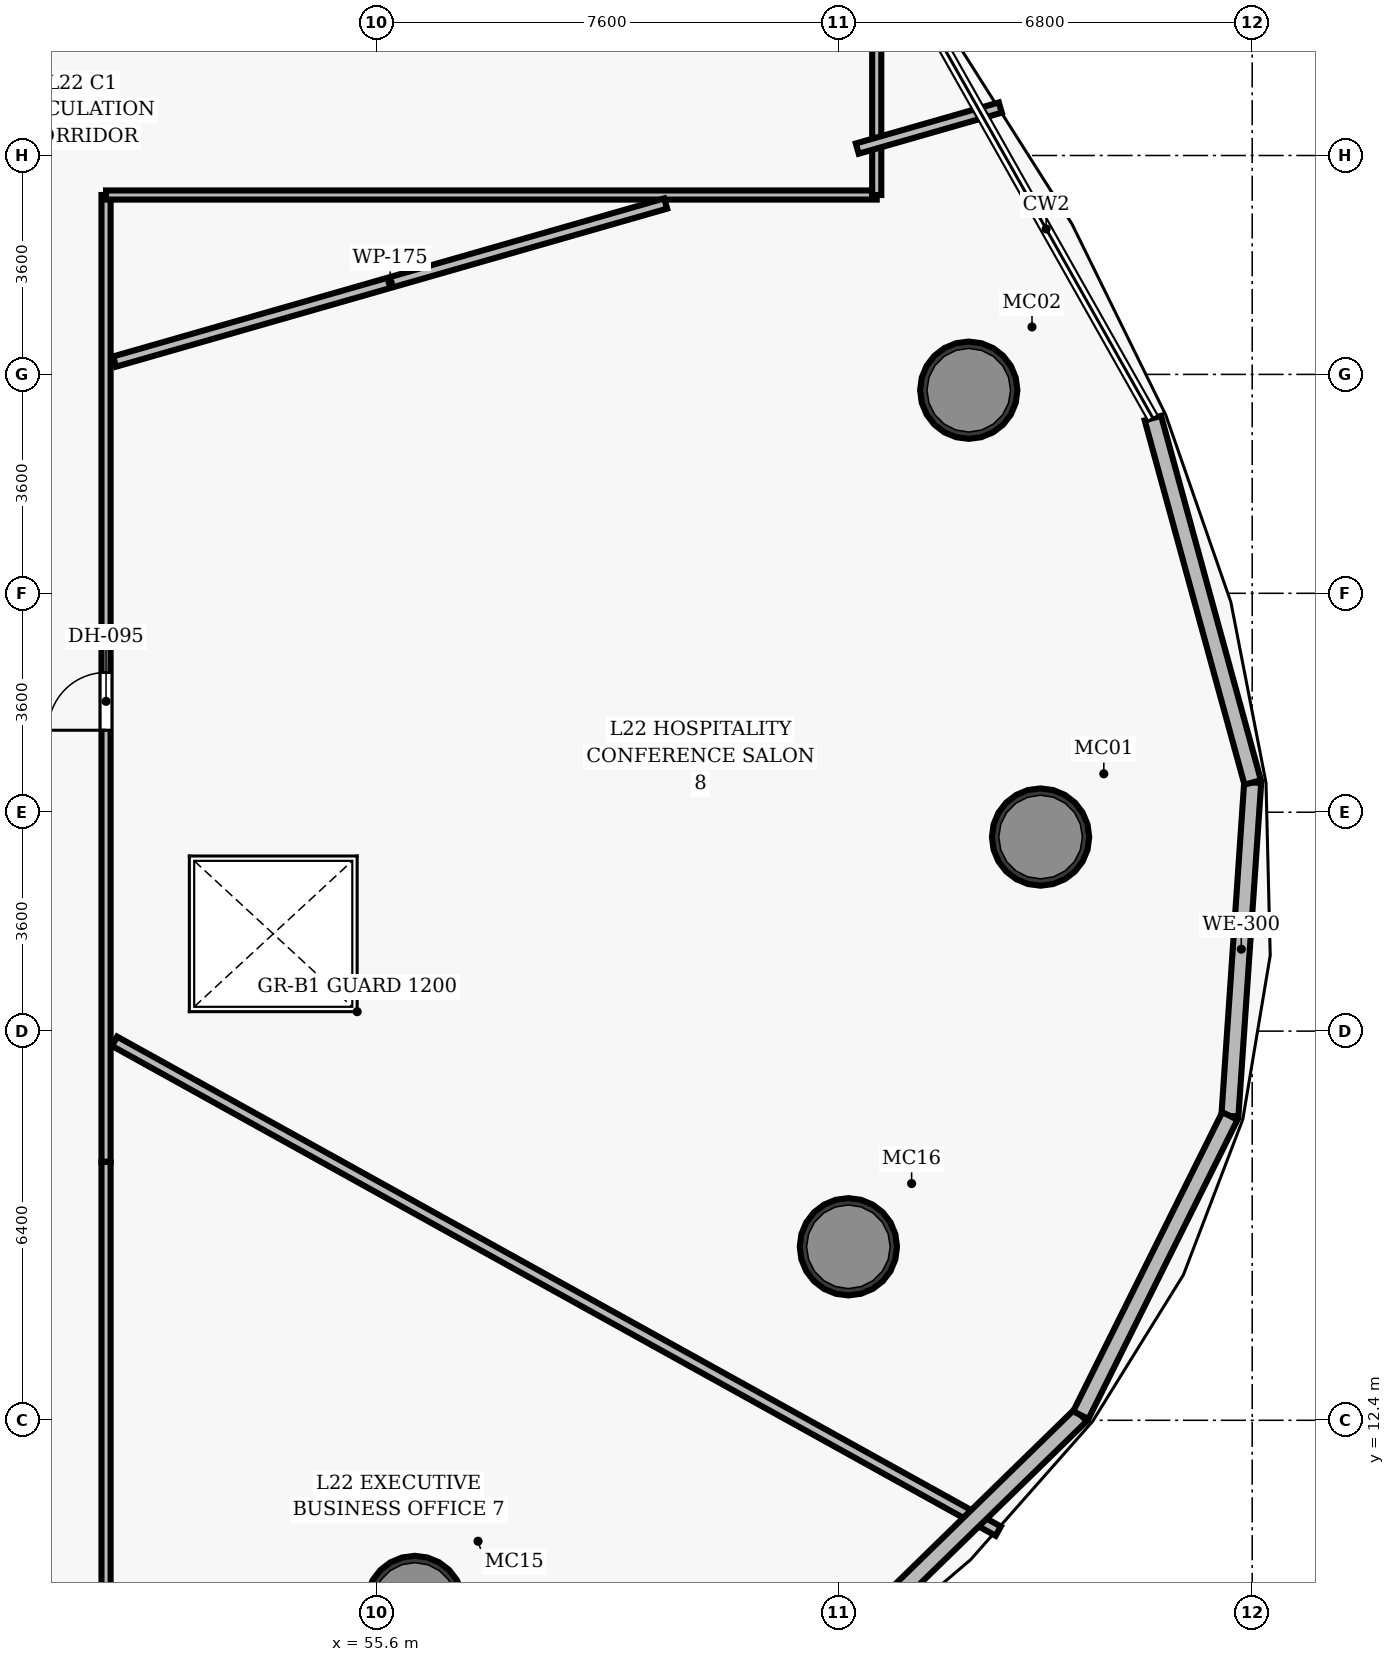
"""IFC4 building model, lengths in metres.
Left out: names, types, materials, properties, quantities, classifications, styles, units other than length and angle.
Written with IfcOpenShell. Run it as: python <this file> out.ifc"""

import sys

from ifc_helpers import new_model, si_unit, direction, frame, frame_2d, origin, origin_2d, place, context, subcontext, project, spatial, rectangle, hollow_circle, extrude, element, fill, save


model = new_model("IFC4")
c1 = context("Model", 3, precision=1e-05, world=origin(), true_north=direction((0.0, 1.0)))
c2 = subcontext(c1, "Body", "Model", "MODEL_VIEW")
j1 = project(units=[si_unit("LENGTHUNIT", "METRE"), si_unit("PLANEANGLEUNIT", "RADIAN")], contexts=[c1])
p1 = place(None, origin())
s1 = spatial("IfcSite", under=j1, at=p1, CompositionType="ELEMENT")
p2 = place(p1, origin())
s2 = spatial("IfcBuilding", under=s1, at=p2, CompositionType="ELEMENT")
p3 = place(p2, frame((0.0, 0.0, 93.9)))
s3 = spatial("IfcBuildingStorey", under=s2, at=p3, CompositionType="ELEMENT", Elevation=93.9)
for number, where, z_axis, x_axis in (
    (1, (66.52, 21.992, 0.0), (0.0, 0.0, 1.0), (1.0, 0.0, 0.0)),
    (2, (65.339, 29.34, 0.0), (0.0, 0.0, 1.0), (1.0, 0.0, 0.0)),
    (3, (56.228, 9.371, 0.0), (0.0, 0.0, 1.0), (1.0, 0.0, 0.0)),
    (4, (63.359, 15.254, 0.0), (0.0, 0.0, 1.0), (1.0, 0.0, 0.0)),
):
    element("IfcColumn", number, at=place(p3, frame(where, z_axis=z_axis, x_axis=x_axis)), inside=s3, PredefinedType="COLUMN", context=c2, shape_type="SweptSolid", body=[
        extrude(hollow_circle(Radius=0.8, WallThickness=0.06, at=origin_2d()), origin(), (0.0, 0.0, 1.0), 3.5),
    ])
p4 = place(p3, frame((51.15, 16.65, 0.0), z_axis=(0.0, 0.0, 1.0), x_axis=(0.0, 1.0, 0.0)))
e5 = element("IfcWall", 5, at=p4, inside=s3, PredefinedType="PARTITIONING", context=c2, shape_type="SweptSolid", body=[
    extrude(rectangle(XDim=15.9, YDim=0.15, at=frame_2d((7.95, 0.0))), origin(), (0.0, 0.0, 1.0), 2.5),
])
p5 = place(p4, frame((7.098, 0.0, 0.0)))
e6 = element("IfcOpeningElement", 6, at=p5, cuts=e5, PredefinedType="OPENING", context=c2, shape_type="SweptSolid", body=[
    extrude(rectangle(XDim=0.95, YDim=2.15, at=frame_2d((0.475, 1.075))), frame((0.0, 0.085, 0.0), z_axis=(0.0, -1.0, 0.0), x_axis=(1.0, 0.0, 0.0)), (0.0, 0.0, 1.0), 0.17),
])
p6 = place(p3, frame((51.15, 32.55, 0.0), z_axis=(0.0, 0.0, 1.0), x_axis=(1.0, 0.0, 0.0)))
e7 = element("IfcWall", 7, at=p6, inside=s3, PredefinedType="PARTITIONING", context=c2, shape_type="SweptSolid", body=[
    extrude(rectangle(XDim=12.675, YDim=0.15, at=frame_2d((6.337, 0.0))), origin(), (0.0, 0.0, 1.0), 2.5),
])
p7 = place(p3, frame((63.825, 32.55, 0.0), z_axis=(0.0, 0.0, 1.0), x_axis=(0.0, 1.0, 0.0)))
e8 = element("IfcWall", 8, at=p7, inside=s3, PredefinedType="PARTITIONING", context=c2, shape_type="SweptSolid", body=[
    extrude(rectangle(XDim=2.8, YDim=0.15, at=frame_2d((1.4, 0.0))), origin(), (0.0, 0.0, 1.0), 2.5),
])
p8 = place(p3, frame((51.15, 6.5, 0.0), z_axis=(0.0, 0.0, 1.0), x_axis=(0.0, 1.0, 0.0)))
e9 = element("IfcWall", 9, at=p8, inside=s3, PredefinedType="PARTITIONING", context=c2, shape_type="SweptSolid", body=[
    extrude(rectangle(XDim=10.15, YDim=0.15, at=frame_2d((5.075, 0.0))), origin(), (0.0, 0.0, 1.0), 2.5),
])
p9 = place(p3, frame((51.29, 29.811, 0.0), z_axis=(0.0, 0.0, 1.0), x_axis=(0.961261668066, 0.275637453019, 0.0)))
e10 = element("IfcWall", 10, at=p9, inside=s3, PredefinedType="PARTITIONING", context=c2, shape_type="SweptSolid", body=[
    extrude(rectangle(XDim=9.429, YDim=0.175, at=frame_2d((4.715, 0.0))), origin(), (0.0, 0.0, 1.0), 2.5),
])
p10 = place(p3, frame((63.505, 33.313, 0.0), z_axis=(0.0, 0.0, 1.0), x_axis=(0.961256191917, 0.275656549898, 0.0)))
e11 = element("IfcWall", 11, at=p10, inside=s3, PredefinedType="PARTITIONING", context=c2, shape_type="SweptSolid", body=[
    extrude(rectangle(XDim=2.447, YDim=0.175, at=frame_2d((1.224, 0.0))), origin(), (0.0, 0.0, 1.0), 2.5),
])
p11 = place(p3, frame((51.29, 18.633, 0.0), z_axis=(0.0, 0.0, 1.0), x_axis=(0.874619141547, -0.4848106406, 0.0)))
e12 = element("IfcWall", 12, at=p11, inside=s3, PredefinedType="PARTITIONING", context=c2, shape_type="SweptSolid", body=[
    extrude(rectangle(XDim=16.617, YDim=0.175, at=frame_2d((8.308, 0.0))), origin(), (0.0, 0.0, 1.0), 2.5),
])
p12 = place(p3, frame((70.008, 22.89, 0.0), z_axis=(0.0, 0.0, 1.0), x_axis=(-0.068216787808, -0.997670521696, 0.0)))
e13 = element("IfcWall", 13, at=p12, inside=s3, PredefinedType="SOLIDWALL", context=c2, shape_type="SweptSolid", body=[
    extrude(rectangle(XDim=5.497, YDim=0.28, at=frame_2d((2.749, 0.0))), origin(), (0.0, 0.0, 1.0), 3.15),
])
p13 = place(p3, frame((68.367, 28.881, 0.0), z_axis=(0.0, 0.0, 1.0), x_axis=(0.264214615474, -0.964463911699, 0.0)))
e14 = element("IfcWall", 14, at=p13, inside=s3, PredefinedType="SOLIDWALL", context=c2, shape_type="SweptSolid", body=[
    extrude(rectangle(XDim=6.212, YDim=0.28, at=frame_2d((3.106, 0.0))), origin(), (0.0, 0.0, 1.0), 3.15),
])
p14 = place(p3, frame((67.181, 12.485, 0.0), z_axis=(0.0, 0.0, 1.0), x_axis=(-0.715952500347, -0.698148993587, 0.0)))
e15 = element("IfcWall", 15, at=p14, inside=s3, PredefinedType="SOLIDWALL", context=c2, shape_type="SweptSolid", body=[
    extrude(rectangle(XDim=6.212, YDim=0.28, at=frame_2d((3.106, 0.0))), origin(), (0.0, 0.0, 1.0), 3.15),
])
p15 = place(p3, frame((69.633, 17.406, 0.0), z_axis=(0.0, 0.0, 1.0), x_axis=(-0.446005247533, -0.895030345392, 0.0)))
e16 = element("IfcWall", 16, at=p15, inside=s3, PredefinedType="SOLIDWALL", context=c2, shape_type="SweptSolid", body=[
    extrude(rectangle(XDim=5.498, YDim=0.28, at=frame_2d((2.749, 0.0))), origin(), (0.0, 0.0, 1.0), 3.15),
])
p16 = place(p5, origin())
e17 = element("IfcDoor", 17, at=p16, inside=s3, OperationType="SINGLE_SWING_LEFT", PredefinedType="DOOR", context=c2, shape_type="SweptSolid", body=[
    extrude(rectangle(XDim=0.95, YDim=2.15, at=frame_2d((0.475, 1.075))), frame((0.0, 0.025, 0.0), z_axis=(0.0, -1.0, 0.0), x_axis=(1.0, 0.0, 0.0)), (0.0, 0.0, 1.0), 0.05),
])
fill(e6, e17)
save(model, sys.argv[1])
